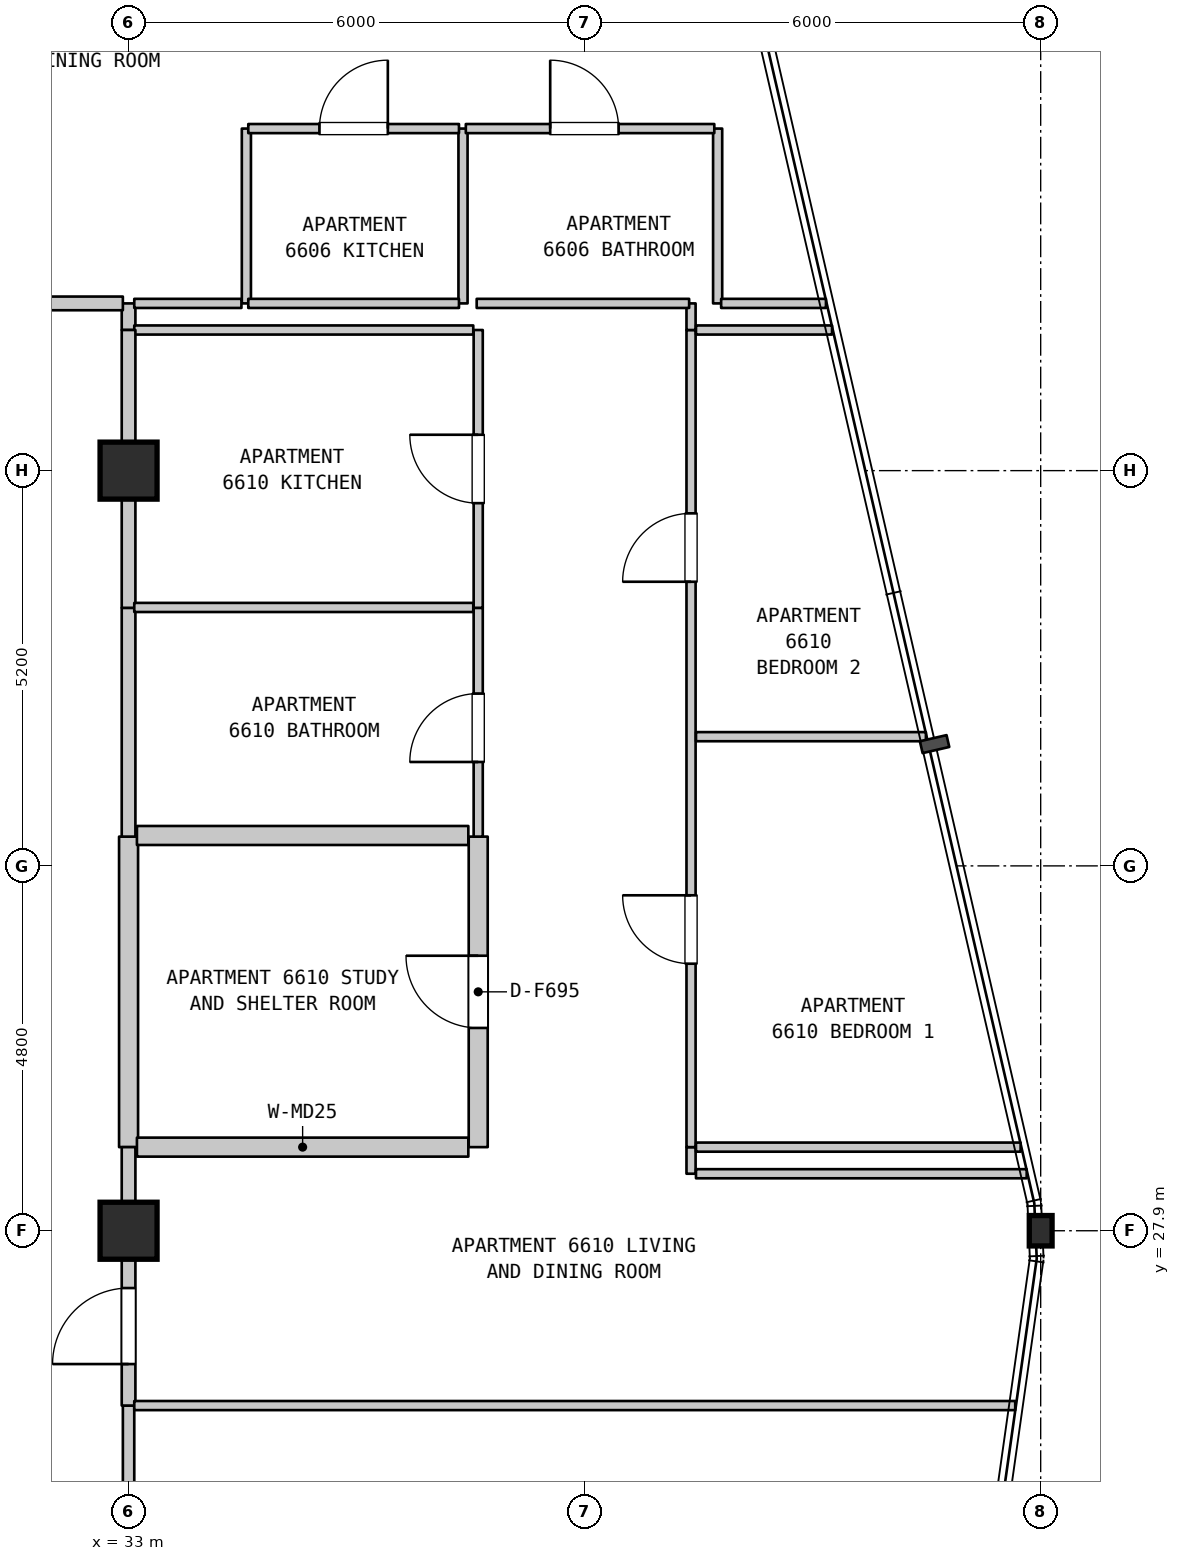
"""IFC4 building model, lengths in metres.
Left out: names, types, materials, properties, quantities, classifications, styles, units other than length and angle.
Written with IfcOpenShell. Run it as: python <this file> out.ifc"""

import sys

from ifc_helpers import new_model, si_unit, direction, frame, frame_2d, origin, origin_2d, place, context, subcontext, project, spatial, rectangle, i_section, extrude, element, fill, save


model = new_model("IFC4")
c1 = context("Model", 3, precision=1e-05, world=origin(), true_north=direction((0.0, 1.0)))
c2 = subcontext(c1, "Body", "Model", "MODEL_VIEW")
j1 = project(units=[si_unit("LENGTHUNIT", "METRE"), si_unit("PLANEANGLEUNIT", "RADIAN")], contexts=[c1])
p1 = place(None, origin())
s1 = spatial("IfcSite", under=j1, at=p1, CompositionType="ELEMENT")
p2 = place(p1, origin())
s2 = spatial("IfcBuilding", under=s1, at=p2, CompositionType="ELEMENT")
p3 = place(p2, frame((0.0, 0.0, 265.8)))
s3 = spatial("IfcBuildingStorey", under=s2, at=p3, CompositionType="ELEMENT", Elevation=265.8)
for number, where, z_axis, x_axis in (
    (1, (33.0, 27.9, 0.0), (0.0, 0.0, 1.0), (1.0, 0.0, 0.0)),
    (2, (33.0, 37.9, 0.0), (0.0, 0.0, 1.0), (1.0, 0.0, 0.0)),
):
    element("IfcColumn", number, at=place(p3, frame(where, z_axis=z_axis, x_axis=x_axis)), inside=s3, PredefinedType="COLUMN", context=c2, shape_type="SweptSolid", body=[
        extrude(rectangle(XDim=0.75, YDim=0.75, at=origin_2d()), origin(), (0.0, 0.0, 1.0), 3.7),
    ])
p4 = place(p3, frame((45.0, 27.9, 0.0), z_axis=(0.0, 0.0, 1.0), x_axis=(1.0, 0.0, 0.0)))
e3 = element("IfcColumn", 3, at=p4, inside=s3, PredefinedType="COLUMN", context=c2, shape_type="SweptSolid", body=[
    extrude(i_section(OverallWidth=0.3, OverallDepth=0.4, WebThickness=0.013, FlangeThickness=0.024, FilletRadius=0.027, at=origin_2d()), origin(), (0.0, 0.0, 1.0), 3.7),
])
p5 = place(p3, frame((33.0, 19.5, 0.0), z_axis=(0.0, 0.0, 1.0), x_axis=(0.0, 1.0, 0.0)))
e4 = element("IfcWall", 4, at=p5, inside=s3, PredefinedType="STANDARD", context=c2, shape_type="SweptSolid", body=[
    extrude(rectangle(XDim=6.1, YDim=0.15, at=frame_2d((3.05, 0.0))), origin(), (0.0, 0.0, 1.0), 3.1),
])
p6 = place(p5, frame((1.545, 0.0, 0.0)))
e5 = element("IfcOpeningElement", 5, at=p6, cuts=e4, PredefinedType="OPENING", context=c2, shape_type="SweptSolid", body=[
    extrude(rectangle(XDim=1.0, YDim=2.15, at=frame_2d((0.5, 1.075))), frame((0.0, 0.085, 0.0), z_axis=(0.0, -1.0, 0.0), x_axis=(1.0, 0.0, 0.0)), (0.0, 0.0, 1.0), 0.17),
])
p7 = place(p3, frame((33.0, 25.6, 0.0), z_axis=(0.0, 0.0, 1.0), x_axis=(0.0, 1.0, 0.0)))
e6 = element("IfcWall", 6, at=p7, inside=s3, PredefinedType="STANDARD", context=c2, shape_type="SweptSolid", body=[
    extrude(rectangle(XDim=2.3, YDim=0.18, at=frame_2d((1.15, 0.0))), origin(), (0.0, 0.0, 1.0), 3.1),
])
p8 = place(p7, frame((0.546, 0.0, 0.0)))
e7 = element("IfcOpeningElement", 7, at=p8, cuts=e6, PredefinedType="OPENING", context=c2, shape_type="SweptSolid", body=[
    extrude(rectangle(XDim=1.0, YDim=2.15, at=frame_2d((0.5, 1.075))), frame((0.0, 0.1, 0.0), z_axis=(0.0, -1.0, 0.0), x_axis=(1.0, 0.0, 0.0)), (0.0, 0.0, 1.0), 0.2),
])
p9 = place(p3, frame((33.0, 29.0, 0.0), z_axis=(0.0, 0.0, 1.0), x_axis=(0.0, 1.0, 0.0)))
e8 = element("IfcWall", 8, at=p9, inside=s3, PredefinedType="STANDARD", context=c2, shape_type="SweptSolid", body=[
    extrude(rectangle(XDim=4.085, YDim=0.25, at=frame_2d((2.042, 0.0))), origin(), (0.0, 0.0, 1.0), 2.89),
])
p10 = place(p3, frame((33.0, 33.085, 0.0), z_axis=(0.0, 0.0, 1.0), x_axis=(0.0, 1.0, 0.0)))
e9 = element("IfcWall", 9, at=p10, inside=s3, PredefinedType="STANDARD", context=c2, shape_type="SweptSolid", body=[
    extrude(rectangle(XDim=3.01, YDim=0.18, at=frame_2d((1.505, 0.0))), origin(), (0.0, 0.0, 1.0), 2.89),
])
p11 = place(p3, frame((33.0, 36.095, 0.0), z_axis=(0.0, 0.0, 1.0), x_axis=(0.0, 1.0, 0.0)))
e10 = element("IfcWall", 10, at=p11, inside=s3, PredefinedType="STANDARD", context=c2, shape_type="SweptSolid", body=[
    extrude(rectangle(XDim=1.805, YDim=0.18, at=frame_2d((0.902, 0.0))), origin(), (0.0, 0.0, 1.0), 2.89),
])
p12 = place(p3, frame((33.0, 39.75, 0.0), z_axis=(0.0, 0.0, 1.0), x_axis=(0.0, 1.0, 0.0)))
e11 = element("IfcWall", 11, at=p12, inside=s3, PredefinedType="STANDARD", context=c2, shape_type="SweptSolid", body=[
    extrude(rectangle(XDim=0.35, YDim=0.18, at=frame_2d((0.175, 0.0))), origin(), (0.0, 0.0, 1.0), 3.39),
])
for number, where, z_axis, x_axis in (
    (12, (34.55, 40.1, 0.0), (0.0, 0.0, 1.0), (0.0, 1.0, 0.0)),
    (13, (37.4, 40.1, 0.0), (0.0, 0.0, 1.0), (0.0, 1.0, 0.0)),
):
    element("IfcWall", number, at=place(p3, frame(where, z_axis=z_axis, x_axis=x_axis)), inside=s3, PredefinedType="PARTITIONING", context=c2, shape_type="SweptSolid", body=[
        extrude(rectangle(XDim=2.3, YDim=0.12, at=frame_2d((1.15, 0.0))), origin(), (0.0, 0.0, 1.0), 3.39),
    ])
p13 = place(p3, frame((37.6, 29.0, 0.0), z_axis=(0.0, 0.0, 1.0), x_axis=(0.0, 1.0, 0.0)))
e14 = element("IfcWall", 14, at=p13, inside=s3, PredefinedType="STANDARD", context=c2, shape_type="SweptSolid", body=[
    extrude(rectangle(XDim=4.085, YDim=0.25, at=frame_2d((2.042, 0.0))), origin(), (0.0, 0.0, 1.0), 3.39),
])
p14 = place(p13, frame((1.568, 0.0, 0.0)))
e15 = element("IfcOpeningElement", 15, at=p14, cuts=e14, PredefinedType="OPENING", context=c2, shape_type="SweptSolid", body=[
    extrude(rectangle(XDim=0.95, YDim=2.15, at=frame_2d((0.475, 1.075))), frame((0.0, 0.135, 0.0), z_axis=(0.0, -1.0, 0.0), x_axis=(1.0, 0.0, 0.0)), (0.0, 0.0, 1.0), 0.27),
])
p15 = place(p3, frame((37.6, 33.085, 0.0), z_axis=(0.0, 0.0, 1.0), x_axis=(0.0, 1.0, 0.0)))
e16 = element("IfcWall", 16, at=p15, inside=s3, PredefinedType="PARTITIONING", context=c2, shape_type="SweptSolid", body=[
    extrude(rectangle(XDim=3.01, YDim=0.12, at=frame_2d((1.505, 0.0))), origin(), (0.0, 0.0, 1.0), 3.39),
])
p16 = place(p15, frame((0.982, 0.0, 0.0)))
e17 = element("IfcOpeningElement", 17, at=p16, cuts=e16, PredefinedType="OPENING", context=c2, shape_type="SweptSolid", body=[
    extrude(rectangle(XDim=0.9, YDim=2.1, at=frame_2d((0.45, 1.05))), frame((0.0, 0.07, 0.0), z_axis=(0.0, -1.0, 0.0), x_axis=(1.0, 0.0, 0.0)), (0.0, 0.0, 1.0), 0.14),
])
p17 = place(p3, frame((37.6, 36.095, 0.0), z_axis=(0.0, 0.0, 1.0), x_axis=(0.0, 1.0, 0.0)))
e18 = element("IfcWall", 18, at=p17, inside=s3, PredefinedType="PARTITIONING", context=c2, shape_type="SweptSolid", body=[
    extrude(rectangle(XDim=3.655, YDim=0.12, at=frame_2d((1.828, 0.0))), origin(), (0.0, 0.0, 1.0), 3.39),
])
p18 = place(p17, frame((1.377, 0.0, 0.0)))
e19 = element("IfcOpeningElement", 19, at=p18, cuts=e18, PredefinedType="OPENING", context=c2, shape_type="SweptSolid", body=[
    extrude(rectangle(XDim=0.9, YDim=2.15, at=frame_2d((0.45, 1.075))), frame((0.0, 0.07, 0.0), z_axis=(0.0, -1.0, 0.0), x_axis=(1.0, 0.0, 0.0)), (0.0, 0.0, 1.0), 0.14),
])
p19 = place(p3, frame((40.4, 28.65, 0.0), z_axis=(0.0, 0.0, 1.0), x_axis=(0.0, 1.0, 0.0)))
e20 = element("IfcWall", 20, at=p19, inside=s3, PredefinedType="PARTITIONING", context=c2, shape_type="SweptSolid", body=[
    extrude(rectangle(XDim=0.35, YDim=0.12, at=frame_2d((0.175, 0.0))), origin(), (0.0, 0.0, 1.0), 3.39),
])
p20 = place(p3, frame((40.4, 29.0, 0.0), z_axis=(0.0, 0.0, 1.0), x_axis=(0.0, 1.0, 0.0)))
e21 = element("IfcWall", 21, at=p20, inside=s3, PredefinedType="PARTITIONING", context=c2, shape_type="SweptSolid", body=[
    extrude(rectangle(XDim=10.75, YDim=0.12, at=frame_2d((5.375, 0.0))), origin(), (0.0, 0.0, 1.0), 3.39),
])
p21 = place(p20, frame((2.413, 0.0, 0.0)))
e22 = element("IfcOpeningElement", 22, at=p21, cuts=e21, PredefinedType="OPENING", context=c2, shape_type="SweptSolid", body=[
    extrude(rectangle(XDim=0.9, YDim=2.15, at=frame_2d((0.45, 1.075))), frame((0.0, 0.07, 0.0), z_axis=(0.0, -1.0, 0.0), x_axis=(1.0, 0.0, 0.0)), (0.0, 0.0, 1.0), 0.14),
])
p22 = place(p20, frame((7.438, 0.0, 0.0)))
e23 = element("IfcOpeningElement", 23, at=p22, cuts=e21, PredefinedType="OPENING", context=c2, shape_type="SweptSolid", body=[
    extrude(rectangle(XDim=0.9, YDim=2.15, at=frame_2d((0.45, 1.075))), frame((0.0, 0.07, 0.0), z_axis=(0.0, -1.0, 0.0), x_axis=(1.0, 0.0, 0.0)), (0.0, 0.0, 1.0), 0.14),
])
p23 = place(p3, frame((40.4, 39.75, 0.0), z_axis=(0.0, 0.0, 1.0), x_axis=(0.0, 1.0, 0.0)))
e24 = element("IfcWall", 24, at=p23, inside=s3, PredefinedType="PARTITIONING", context=c2, shape_type="SweptSolid", body=[
    extrude(rectangle(XDim=0.35, YDim=0.12, at=frame_2d((0.175, 0.0))), origin(), (0.0, 0.0, 1.0), 3.39),
])
p24 = place(p3, frame((40.75, 40.1, 0.0), z_axis=(0.0, 0.0, 1.0), x_axis=(0.0, 1.0, 0.0)))
e25 = element("IfcWall", 25, at=p24, inside=s3, PredefinedType="PARTITIONING", context=c2, shape_type="SweptSolid", body=[
    extrude(rectangle(XDim=2.3, YDim=0.12, at=frame_2d((1.15, 0.0))), origin(), (0.0, 0.0, 1.0), 3.39),
])
p25 = place(p3, frame((33.075, 25.6, 0.0), z_axis=(0.0, 0.0, 1.0), x_axis=(1.0, 0.0, 0.0)))
e26 = element("IfcWall", 26, at=p25, inside=s3, PredefinedType="PARTITIONING", context=c2, shape_type="SweptSolid", body=[
    extrude(rectangle(XDim=11.59, YDim=0.12, at=frame_2d((5.795, 0.0))), origin(), (0.0, 0.0, 1.0), 3.39),
])
p26 = place(p3, frame((40.465, 28.65, 0.0), z_axis=(0.0, 0.0, 1.0), x_axis=(1.0, 0.0, 0.0)))
e27 = element("IfcWall", 27, at=p26, inside=s3, PredefinedType="PARTITIONING", context=c2, shape_type="SweptSolid", body=[
    extrude(rectangle(XDim=4.351, YDim=0.12, at=frame_2d((2.175, 0.0))), origin(), (0.0, 0.0, 1.0), 3.39),
])
p27 = place(p3, frame((33.11, 29.0, 0.0), z_axis=(0.0, 0.0, 1.0), x_axis=(1.0, 0.0, 0.0)))
e28 = element("IfcWall", 28, at=p27, inside=s3, PredefinedType="STANDARD", context=c2, shape_type="SweptSolid", body=[
    extrude(rectangle(XDim=4.36, YDim=0.25, at=frame_2d((2.18, 0.0))), origin(), (0.0, 0.0, 1.0), 3.39),
])
p28 = place(p3, frame((40.465, 29.0, 0.0), z_axis=(0.0, 0.0, 1.0), x_axis=(1.0, 0.0, 0.0)))
e29 = element("IfcWall", 29, at=p28, inside=s3, PredefinedType="PARTITIONING", context=c2, shape_type="SweptSolid", body=[
    extrude(rectangle(XDim=4.271, YDim=0.12, at=frame_2d((2.135, 0.0))), origin(), (0.0, 0.0, 1.0), 3.39),
])
p29 = place(p3, frame((33.11, 33.1, 0.0), z_axis=(0.0, 0.0, 1.0), x_axis=(1.0, 0.0, 0.0)))
e30 = element("IfcWall", 30, at=p29, inside=s3, PredefinedType="STANDARD", context=c2, shape_type="SweptSolid", body=[
    extrude(rectangle(XDim=4.36, YDim=0.25, at=frame_2d((2.18, 0.0))), origin(), (0.0, 0.0, 1.0), 3.39),
])
p30 = place(p3, frame((40.465, 34.4, 0.0), z_axis=(0.0, 0.0, 1.0), x_axis=(1.0, 0.0, 0.0)))
e31 = element("IfcWall", 31, at=p30, inside=s3, PredefinedType="PARTITIONING", context=c2, shape_type="SweptSolid", body=[
    extrude(rectangle(XDim=3.025, YDim=0.12, at=frame_2d((1.512, 0.0))), origin(), (0.0, 0.0, 1.0), 3.39),
])
for number, where, z_axis, x_axis in (
    (32, (33.075, 36.1, 0.0), (0.0, 0.0, 1.0), (1.0, 0.0, 0.0)),
    (33, (33.075, 39.75, 0.0), (0.0, 0.0, 1.0), (1.0, 0.0, 0.0)),
):
    element("IfcWall", number, at=place(p3, frame(where, z_axis=z_axis, x_axis=x_axis)), inside=s3, PredefinedType="PARTITIONING", context=c2, shape_type="SweptSolid", body=[
        extrude(rectangle(XDim=4.46, YDim=0.12, at=frame_2d((2.23, 0.0))), origin(), (0.0, 0.0, 1.0), 3.39),
    ])
p31 = place(p3, frame((40.465, 39.75, 0.0), z_axis=(0.0, 0.0, 1.0), x_axis=(1.0, 0.0, 0.0)))
e34 = element("IfcWall", 34, at=p31, inside=s3, PredefinedType="PARTITIONING", context=c2, shape_type="SweptSolid", body=[
    extrude(rectangle(XDim=1.79, YDim=0.12, at=frame_2d((0.895, 0.0))), origin(), (0.0, 0.0, 1.0), 3.39),
])
p32 = place(p3, frame((29.395, 40.1, 0.0), z_axis=(0.0, 0.0, 1.0), x_axis=(1.0, 0.0, 0.0)))
e35 = element("IfcWall", 35, at=p32, inside=s3, PredefinedType="STANDARD", context=c2, shape_type="SweptSolid", body=[
    extrude(rectangle(XDim=3.53, YDim=0.18, at=frame_2d((1.765, 0.0))), origin(), (0.0, 0.0, 1.0), 3.39),
])
p33 = place(p32, frame((1.48, 0.0, 0.0)))
e36 = element("IfcOpeningElement", 36, at=p33, cuts=e35, PredefinedType="OPENING", context=c2, shape_type="SweptSolid", body=[
    extrude(rectangle(XDim=1.0, YDim=2.15, at=frame_2d((0.5, 1.075))), frame((0.0, 0.1, 0.0), z_axis=(0.0, -1.0, 0.0), x_axis=(1.0, 0.0, 0.0)), (0.0, 0.0, 1.0), 0.2),
])
p34 = place(p3, frame((33.075, 40.1, 0.0), z_axis=(0.0, 0.0, 1.0), x_axis=(1.0, 0.0, 0.0)))
e37 = element("IfcWall", 37, at=p34, inside=s3, PredefinedType="PARTITIONING", context=c2, shape_type="SweptSolid", body=[
    extrude(rectangle(XDim=1.41, YDim=0.12, at=frame_2d((0.705, 0.0))), origin(), (0.0, 0.0, 1.0), 3.39),
])
p35 = place(p3, frame((34.575, 40.1, 0.0), z_axis=(0.0, 0.0, 1.0), x_axis=(1.0, 0.0, 0.0)))
e38 = element("IfcWall", 38, at=p35, inside=s3, PredefinedType="PARTITIONING", context=c2, shape_type="SweptSolid", body=[
    extrude(rectangle(XDim=2.772, YDim=0.12, at=frame_2d((1.386, 0.0))), origin(), (0.0, 0.0, 1.0), 3.39),
])
p36 = place(p3, frame((37.58, 40.1, 0.0), z_axis=(0.0, 0.0, 1.0), x_axis=(1.0, 0.0, 0.0)))
e39 = element("IfcWall", 39, at=p36, inside=s3, PredefinedType="PARTITIONING", context=c2, shape_type="SweptSolid", body=[
    extrude(rectangle(XDim=2.795, YDim=0.12, at=frame_2d((1.397, 0.0))), origin(), (0.0, 0.0, 1.0), 3.39),
])
p37 = place(p3, frame((40.796, 40.1, 0.0), z_axis=(0.0, 0.0, 1.0), x_axis=(1.0, 0.0, 0.0)))
e40 = element("IfcWall", 40, at=p37, inside=s3, PredefinedType="PARTITIONING", context=c2, shape_type="SweptSolid", body=[
    extrude(rectangle(XDim=1.379, YDim=0.12, at=frame_2d((0.689, 0.0))), origin(), (0.0, 0.0, 1.0), 3.39),
])
p38 = place(p3, frame((34.575, 42.4, 0.0), z_axis=(0.0, 0.0, 1.0), x_axis=(1.0, 0.0, 0.0)))
e41 = element("IfcWall", 41, at=p38, inside=s3, PredefinedType="PARTITIONING", context=c2, shape_type="SweptSolid", body=[
    extrude(rectangle(XDim=2.772, YDim=0.12, at=frame_2d((1.386, 0.0))), origin(), (0.0, 0.0, 1.0), 3.39),
])
p39 = place(p38, frame((0.936, 0.0, 0.0)))
e42 = element("IfcOpeningElement", 42, at=p39, cuts=e41, PredefinedType="OPENING", context=c2, shape_type="SweptSolid", body=[
    extrude(rectangle(XDim=0.9, YDim=2.15, at=frame_2d((0.45, 1.075))), frame((0.0, 0.07, 0.0), z_axis=(0.0, -1.0, 0.0), x_axis=(1.0, 0.0, 0.0)), (0.0, 0.0, 1.0), 0.14),
])
p40 = place(p3, frame((37.437, 42.4, 0.0), z_axis=(0.0, 0.0, 1.0), x_axis=(1.0, 0.0, 0.0)))
e43 = element("IfcWall", 43, at=p40, inside=s3, PredefinedType="PARTITIONING", context=c2, shape_type="SweptSolid", body=[
    extrude(rectangle(XDim=3.269, YDim=0.12, at=frame_2d((1.635, 0.0))), origin(), (0.0, 0.0, 1.0), 3.39),
])
p41 = place(p40, frame((1.11, 0.0, 0.0)))
e44 = element("IfcOpeningElement", 44, at=p41, cuts=e43, PredefinedType="OPENING", context=c2, shape_type="SweptSolid", body=[
    extrude(rectangle(XDim=0.9, YDim=2.1, at=frame_2d((0.45, 1.05))), frame((0.0, 0.07, 0.0), z_axis=(0.0, -1.0, 0.0), x_axis=(1.0, 0.0, 0.0)), (0.0, 0.0, 1.0), 0.14),
])
p42 = place(p3, frame((33.0, 27.9, 0.0), z_axis=(0.0, 0.0, 1.0), x_axis=(0.0, 1.0, 0.0)))
e45 = element("IfcWall", 45, at=p42, inside=s3, PredefinedType="STANDARD", context=c2, shape_type="SweptSolid", body=[
    extrude(rectangle(XDim=1.1, YDim=0.18, at=frame_2d((0.55, 0.0))), origin(), (0.0, 0.0, 1.0), 2.89),
])
p43 = place(p3, frame((33.0, 37.9, 0.0), z_axis=(0.0, 0.0, 1.0), x_axis=(0.0, 1.0, 0.0)))
e46 = element("IfcWall", 46, at=p43, inside=s3, PredefinedType="STANDARD", context=c2, shape_type="SweptSolid", body=[
    extrude(rectangle(XDim=1.85, YDim=0.18, at=frame_2d((0.925, 0.0))), origin(), (0.0, 0.0, 1.0), 2.79),
])
p44 = place(p8, origin())
e47 = element("IfcDoor", 47, at=p44, inside=s3, OperationType="SINGLE_SWING_LEFT", PredefinedType="DOOR", context=c2, shape_type="SweptSolid", body=[
    extrude(rectangle(XDim=1.0, YDim=2.15, at=frame_2d((0.5, 1.075))), frame((0.0, 0.025, 0.0), z_axis=(0.0, -1.0, 0.0), x_axis=(1.0, 0.0, 0.0)), (0.0, 0.0, 1.0), 0.05),
])
fill(e7, e47)
p45 = place(p14, origin())
e48 = element("IfcDoor", 48, at=p45, inside=s3, OperationType="SINGLE_SWING_RIGHT", PredefinedType="DOOR", context=c2, shape_type="SweptSolid", body=[
    extrude(rectangle(XDim=0.95, YDim=2.15, at=frame_2d((0.475, 1.075))), frame((0.0, 0.025, 0.0), z_axis=(0.0, -1.0, 0.0), x_axis=(1.0, 0.0, 0.0)), (0.0, 0.0, 1.0), 0.05),
])
fill(e15, e48)
p46 = place(p16, origin())
e49 = element("IfcDoor", 49, at=p46, inside=s3, OperationType="SINGLE_SWING_LEFT", PredefinedType="DOOR", context=c2, shape_type="SweptSolid", body=[
    extrude(rectangle(XDim=0.9, YDim=2.1, at=frame_2d((0.45, 1.05))), frame((0.0, 0.025, 0.0), z_axis=(0.0, -1.0, 0.0), x_axis=(1.0, 0.0, 0.0)), (0.0, 0.0, 1.0), 0.05),
])
fill(e17, e49)
p47 = place(p18, origin())
e50 = element("IfcDoor", 50, at=p47, inside=s3, OperationType="SINGLE_SWING_RIGHT", PredefinedType="DOOR", context=c2, shape_type="SweptSolid", body=[
    extrude(rectangle(XDim=0.9, YDim=2.15, at=frame_2d((0.45, 1.075))), frame((0.0, 0.025, 0.0), z_axis=(0.0, -1.0, 0.0), x_axis=(1.0, 0.0, 0.0)), (0.0, 0.0, 1.0), 0.05),
])
fill(e19, e50)
p48 = place(p21, origin())
e51 = element("IfcDoor", 51, at=p48, inside=s3, OperationType="SINGLE_SWING_RIGHT", PredefinedType="DOOR", context=c2, shape_type="SweptSolid", body=[
    extrude(rectangle(XDim=0.9, YDim=2.15, at=frame_2d((0.45, 1.075))), frame((0.0, 0.025, 0.0), z_axis=(0.0, -1.0, 0.0), x_axis=(1.0, 0.0, 0.0)), (0.0, 0.0, 1.0), 0.05),
])
fill(e22, e51)
p49 = place(p22, origin())
e52 = element("IfcDoor", 52, at=p49, inside=s3, OperationType="SINGLE_SWING_LEFT", PredefinedType="DOOR", context=c2, shape_type="SweptSolid", body=[
    extrude(rectangle(XDim=0.9, YDim=2.15, at=frame_2d((0.45, 1.075))), frame((0.0, 0.025, 0.0), z_axis=(0.0, -1.0, 0.0), x_axis=(1.0, 0.0, 0.0)), (0.0, 0.0, 1.0), 0.05),
])
fill(e23, e52)
p50 = place(p39, origin())
e53 = element("IfcDoor", 53, at=p50, inside=s3, OperationType="SINGLE_SWING_RIGHT", PredefinedType="DOOR", context=c2, shape_type="SweptSolid", body=[
    extrude(rectangle(XDim=0.9, YDim=2.15, at=frame_2d((0.45, 1.075))), frame((0.0, 0.025, 0.0), z_axis=(0.0, -1.0, 0.0), x_axis=(1.0, 0.0, 0.0)), (0.0, 0.0, 1.0), 0.05),
])
fill(e42, e53)
p51 = place(p41, origin())
e54 = element("IfcDoor", 54, at=p51, inside=s3, OperationType="SINGLE_SWING_LEFT", PredefinedType="DOOR", context=c2, shape_type="SweptSolid", body=[
    extrude(rectangle(XDim=0.9, YDim=2.1, at=frame_2d((0.45, 1.05))), frame((0.0, 0.025, 0.0), z_axis=(0.0, -1.0, 0.0), x_axis=(1.0, 0.0, 0.0)), (0.0, 0.0, 1.0), 0.05),
])
fill(e44, e54)
save(model, sys.argv[1])
